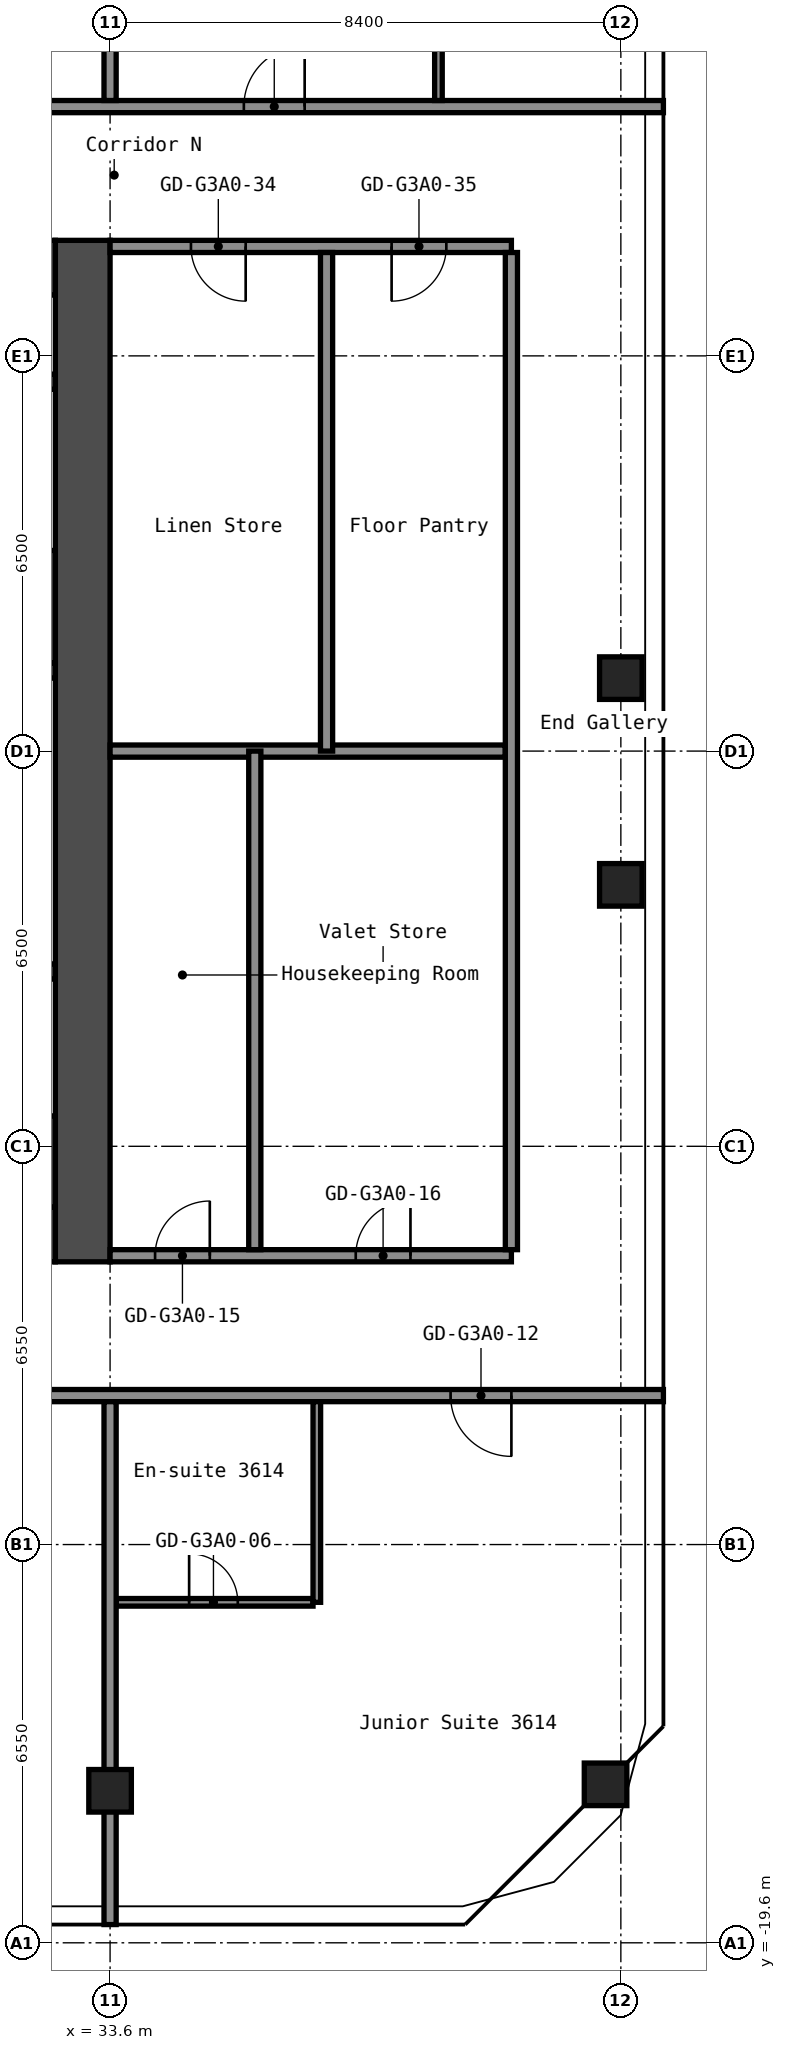
"""IFC4 building model, lengths in metres.
Left out: names, types, materials, properties, quantities, classifications, styles, units other than length and angle.
Written with IfcOpenShell. Run it as: python <this file> out.ifc"""

import sys

from ifc_helpers import new_model, si_unit, direction, frame, frame_2d, origin, origin_2d, place, context, subcontext, project, spatial, rectangle, hollow_rectangle, extrude, element, fill, save


model = new_model("IFC4")
c1 = context("Model", 3, precision=1e-05, world=origin(), true_north=direction((0.0, 1.0)))
c2 = subcontext(c1, "Body", "Model", "MODEL_VIEW")
j1 = project(units=[si_unit("LENGTHUNIT", "METRE"), si_unit("PLANEANGLEUNIT", "RADIAN")], contexts=[c1])
p1 = place(None, origin())
s1 = spatial("IfcSite", under=j1, at=p1, CompositionType="ELEMENT")
p2 = place(p1, origin())
s2 = spatial("IfcBuilding", under=s1, at=p2, CompositionType="ELEMENT")
p3 = place(p2, frame((0.0, 0.0, 131.0)))
s3 = spatial("IfcBuildingStorey", under=s2, at=p3, CompositionType="ELEMENT", Elevation=131.0)
for number, where, z_axis, x_axis in (
    (1, (33.6, -17.1, 0.0), (0.0, 0.0, 1.0), (1.0, 0.0, 0.0)),
    (2, (41.749, -16.994, 0.0), (0.0, 0.0, 1.0), (1.0, 0.0, 0.0)),
    (3, (42.0, -2.2, 0.0), (0.0, 0.0, 1.0), (1.0, 0.0, 0.0)),
    (4, (42.0, 1.2, 0.0), (0.0, 0.0, 1.0), (1.0, 0.0, 0.0)),
):
    element("IfcColumn", number, at=place(p3, frame(where, z_axis=z_axis, x_axis=x_axis)), inside=s3, PredefinedType="COLUMN", context=c2, shape_type="SweptSolid", body=[
        extrude(hollow_rectangle(XDim=0.7, YDim=0.7, WallThickness=0.028, at=origin_2d()), origin(), (0.0, 0.0, 1.0), 2.75),
    ])
p4 = place(p3, frame((33.15, -8.4, 0.0), z_axis=(0.0, 0.0, 1.0), x_axis=(0.0, 1.0, 0.0)))
e5 = element("IfcWall", 5, at=p4, inside=s3, PredefinedType="SHEAR", context=c2, shape_type="SweptSolid", body=[
    extrude(rectangle(XDim=16.8, YDim=0.9, at=frame_2d((8.4, 0.0))), origin(), (0.0, 0.0, 1.0), 2.75),
])
p5 = place(p3, frame((17.7, 7.95, 0.0), z_axis=(0.0, 0.0, 1.0), x_axis=(1.0, 0.0, 0.0)))
e6 = element("IfcWall", 6, at=p5, inside=s3, PredefinedType="SHEAR", context=c2, shape_type="SweptSolid", body=[
    extrude(rectangle(XDim=15.0, YDim=0.9, at=frame_2d((7.5, 0.0))), origin(), (0.0, 0.0, 1.0), 2.75),
])
p6 = place(p5, frame((10.4, 0.0, 0.0)))
e7 = element("IfcOpeningElement", 7, at=p6, cuts=e6, PredefinedType="OPENING", context=c2, shape_type="SweptSolid", body=[
    extrude(rectangle(XDim=1.2, YDim=2.1, at=frame_2d((0.6, 1.05))), frame((0.0, 0.46, 0.0), z_axis=(0.0, -1.0, 0.0), x_axis=(1.0, 0.0, 0.0)), (0.0, 0.0, 1.0), 0.92),
])
p7 = place(p5, frame((13.35, 0.0, 0.0)))
e8 = element("IfcOpeningElement", 8, at=p7, cuts=e6, PredefinedType="OPENING", context=c2, shape_type="SweptSolid", body=[
    extrude(rectangle(XDim=0.9, YDim=2.1, at=frame_2d((0.45, 1.05))), frame((0.0, 0.46, 0.0), z_axis=(0.0, -1.0, 0.0), x_axis=(1.0, 0.0, 0.0)), (0.0, 0.0, 1.0), 0.92),
])
p8 = place(p3, frame((17.7, -7.95, 0.0), z_axis=(0.0, 0.0, 1.0), x_axis=(1.0, 0.0, 0.0)))
e9 = element("IfcWall", 9, at=p8, inside=s3, PredefinedType="SHEAR", context=c2, shape_type="SweptSolid", body=[
    extrude(rectangle(XDim=15.0, YDim=0.9, at=frame_2d((7.5, 0.0))), origin(), (0.0, 0.0, 1.0), 2.75),
])
p9 = place(p8, frame((2.55, 0.0, 0.0)))
e10 = element("IfcOpeningElement", 10, at=p9, cuts=e9, PredefinedType="OPENING", context=c2, shape_type="SweptSolid", body=[
    extrude(rectangle(XDim=1.0, YDim=2.1, at=frame_2d((0.5, 1.05))), frame((0.0, 0.46, 0.0), z_axis=(0.0, -1.0, 0.0), x_axis=(1.0, 0.0, 0.0)), (0.0, 0.0, 1.0), 0.92),
])
p10 = place(p3, frame((27.65, 1.325, 0.0), z_axis=(0.0, 0.0, 1.0), x_axis=(1.0, 0.0, 0.0)))
e11 = element("IfcWall", 11, at=p10, inside=s3, PredefinedType="SHEAR", context=c2, shape_type="SweptSolid", body=[
    extrude(rectangle(XDim=5.05, YDim=0.25, at=frame_2d((2.525, 0.0))), origin(), (0.0, 0.0, 1.0), 2.75),
])
p11 = place(p10, frame((0.55, 0.0, 0.0)))
e12 = element("IfcOpeningElement", 12, at=p11, cuts=e11, PredefinedType="OPENING", context=c2, shape_type="SweptSolid", body=[
    extrude(rectangle(XDim=1.2, YDim=2.1, at=frame_2d((0.6, 1.05))), frame((0.0, 0.135, 0.0), z_axis=(0.0, -1.0, 0.0), x_axis=(1.0, 0.0, 0.0)), (0.0, 0.0, 1.0), 0.27),
])
p12 = place(p3, frame((30.3, 2.375, 0.0), z_axis=(0.0, 0.0, 1.0), x_axis=(1.0, 0.0, 0.0)))
e13 = element("IfcWall", 13, at=p12, inside=s3, PredefinedType="SHEAR", context=c2, shape_type="SweptSolid", body=[
    extrude(rectangle(XDim=2.4, YDim=1.85, at=frame_2d((1.2, 0.0))), origin(), (0.0, 0.0, 1.0), 2.75),
])
p13 = place(p3, frame((30.3, 6.075, 0.0), z_axis=(0.0, 0.0, 1.0), x_axis=(1.0, 0.0, 0.0)))
e14 = element("IfcWall", 14, at=p13, inside=s3, PredefinedType="SHEAR", context=c2, shape_type="SweptSolid", body=[
    extrude(rectangle(XDim=2.4, YDim=0.25, at=frame_2d((1.2, 0.0))), origin(), (0.0, 0.0, 1.0), 2.75),
])
p14 = place(p3, frame((28.15, -3.625, 0.0), z_axis=(0.0, 0.0, 1.0), x_axis=(1.0, 0.0, 0.0)))
e15 = element("IfcWall", 15, at=p14, inside=s3, PredefinedType="SHEAR", context=c2, shape_type="SweptSolid", body=[
    extrude(rectangle(XDim=4.55, YDim=0.25, at=frame_2d((2.275, 0.0))), origin(), (0.0, 0.0, 1.0), 2.75),
])
p15 = place(p3, frame((28.15, -6.75, 0.0), z_axis=(0.0, 0.0, 1.0), x_axis=(1.0, 0.0, 0.0)))
e16 = element("IfcWall", 16, at=p15, inside=s3, PredefinedType="SHEAR", context=c2, shape_type="SweptSolid", body=[
    extrude(rectangle(XDim=4.55, YDim=1.5, at=frame_2d((2.275, 0.0))), origin(), (0.0, 0.0, 1.0), 2.75),
])
p16 = place(p3, frame((33.7, -14.0, 0.0), z_axis=(0.0, 0.0, 1.0), x_axis=(1.0, 0.0, 0.0)))
e17 = element("IfcWall", 17, at=p16, inside=s3, PredefinedType="PARTITIONING", context=c2, shape_type="SweptSolid", body=[
    extrude(rectangle(XDim=3.238, YDim=0.125, at=frame_2d((1.619, 0.0))), origin(), (0.0, 0.0, 1.0), 2.75),
])
p17 = place(p16, frame((1.2, 0.0, 0.0)))
e18 = element("IfcOpeningElement", 18, at=p17, cuts=e17, PredefinedType="OPENING", context=c2, shape_type="SweptSolid", body=[
    extrude(rectangle(XDim=0.8, YDim=2.1, at=frame_2d((0.4, 1.05))), frame((0.0, 0.073, 0.0), z_axis=(0.0, -1.0, 0.0), x_axis=(1.0, 0.0, 0.0)), (0.0, 0.0, 1.0), 0.145),
])
p18 = place(p3, frame((16.8, -10.6, 0.0), z_axis=(0.0, 0.0, 1.0), x_axis=(1.0, 0.0, 0.0)))
e19 = element("IfcWall", 19, at=p18, inside=s3, PredefinedType="PARTITIONING", context=c2, shape_type="SweptSolid", body=[
    extrude(rectangle(XDim=25.9, YDim=0.2, at=frame_2d((12.95, 0.0))), origin(), (0.0, 0.0, 1.0), 2.75),
])
p19 = place(p18, frame((5.4, 0.0, 0.0)))
e20 = element("IfcOpeningElement", 20, at=p19, cuts=e19, PredefinedType="OPENING", context=c2, shape_type="SweptSolid", body=[
    extrude(rectangle(XDim=1.0, YDim=2.1, at=frame_2d((0.5, 1.05))), frame((0.0, 0.11, 0.0), z_axis=(0.0, -1.0, 0.0), x_axis=(1.0, 0.0, 0.0)), (0.0, 0.0, 1.0), 0.22),
])
p20 = place(p18, frame((13.8, 0.0, 0.0)))
e21 = element("IfcOpeningElement", 21, at=p20, cuts=e19, PredefinedType="OPENING", context=c2, shape_type="SweptSolid", body=[
    extrude(rectangle(XDim=1.0, YDim=2.1, at=frame_2d((0.5, 1.05))), frame((0.0, 0.11, 0.0), z_axis=(0.0, -1.0, 0.0), x_axis=(1.0, 0.0, 0.0)), (0.0, 0.0, 1.0), 0.22),
])
p21 = place(p18, frame((22.4, 0.0, 0.0)))
e22 = element("IfcOpeningElement", 22, at=p21, cuts=e19, PredefinedType="OPENING", context=c2, shape_type="SweptSolid", body=[
    extrude(rectangle(XDim=1.0, YDim=2.1, at=frame_2d((0.5, 1.05))), frame((0.0, 0.11, 0.0), z_axis=(0.0, -1.0, 0.0), x_axis=(1.0, 0.0, 0.0)), (0.0, 0.0, 1.0), 0.22),
])
p22 = place(p3, frame((33.6, -8.3, 0.0), z_axis=(0.0, 0.0, 1.0), x_axis=(1.0, 0.0, 0.0)))
e23 = element("IfcWall", 23, at=p22, inside=s3, PredefinedType="PARTITIONING", context=c2, shape_type="SweptSolid", body=[
    extrude(rectangle(XDim=6.6, YDim=0.2, at=frame_2d((3.3, 0.0))), origin(), (0.0, 0.0, 1.0), 2.75),
])
p23 = place(p22, frame((0.74, 0.0, 0.0)))
e24 = element("IfcOpeningElement", 24, at=p23, cuts=e23, PredefinedType="OPENING", context=c2, shape_type="SweptSolid", body=[
    extrude(rectangle(XDim=0.9, YDim=2.1, at=frame_2d((0.45, 1.05))), frame((0.0, 0.11, 0.0), z_axis=(0.0, -1.0, 0.0), x_axis=(1.0, 0.0, 0.0)), (0.0, 0.0, 1.0), 0.22),
])
p24 = place(p22, frame((4.04, 0.0, 0.0)))
e25 = element("IfcOpeningElement", 25, at=p24, cuts=e23, PredefinedType="OPENING", context=c2, shape_type="SweptSolid", body=[
    extrude(rectangle(XDim=0.9, YDim=2.1, at=frame_2d((0.45, 1.05))), frame((0.0, 0.11, 0.0), z_axis=(0.0, -1.0, 0.0), x_axis=(1.0, 0.0, 0.0)), (0.0, 0.0, 1.0), 0.22),
])
p25 = place(p3, frame((33.6, 0.0, 0.0), z_axis=(0.0, 0.0, 1.0), x_axis=(1.0, 0.0, 0.0)))
e26 = element("IfcWall", 26, at=p25, inside=s3, PredefinedType="PARTITIONING", context=c2, shape_type="SweptSolid", body=[
    extrude(rectangle(XDim=6.5, YDim=0.2, at=frame_2d((3.25, 0.0))), origin(), (0.0, 0.0, 1.0), 2.75),
])
p26 = place(p3, frame((33.6, 8.3, 0.0), z_axis=(0.0, 0.0, 1.0), x_axis=(1.0, 0.0, 0.0)))
e27 = element("IfcWall", 27, at=p26, inside=s3, PredefinedType="PARTITIONING", context=c2, shape_type="SweptSolid", body=[
    extrude(rectangle(XDim=6.6, YDim=0.2, at=frame_2d((3.3, 0.0))), origin(), (0.0, 0.0, 1.0), 2.75),
])
p27 = place(p26, frame((1.33, 0.0, 0.0)))
e28 = element("IfcOpeningElement", 28, at=p27, cuts=e27, PredefinedType="OPENING", context=c2, shape_type="SweptSolid", body=[
    extrude(rectangle(XDim=0.9, YDim=2.1, at=frame_2d((0.45, 1.05))), frame((0.0, 0.11, 0.0), z_axis=(0.0, -1.0, 0.0), x_axis=(1.0, 0.0, 0.0)), (0.0, 0.0, 1.0), 0.22),
])
p28 = place(p26, frame((4.63, 0.0, 0.0)))
e29 = element("IfcOpeningElement", 29, at=p28, cuts=e27, PredefinedType="OPENING", context=c2, shape_type="SweptSolid", body=[
    extrude(rectangle(XDim=0.9, YDim=2.1, at=frame_2d((0.45, 1.05))), frame((0.0, 0.11, 0.0), z_axis=(0.0, -1.0, 0.0), x_axis=(1.0, 0.0, 0.0)), (0.0, 0.0, 1.0), 0.22),
])
p29 = place(p3, frame((16.8, 10.6, 0.0), z_axis=(0.0, 0.0, 1.0), x_axis=(1.0, 0.0, 0.0)))
e30 = element("IfcWall", 30, at=p29, inside=s3, PredefinedType="PARTITIONING", context=c2, shape_type="SweptSolid", body=[
    extrude(rectangle(XDim=25.9, YDim=0.2, at=frame_2d((12.95, 0.0))), origin(), (0.0, 0.0, 1.0), 2.75),
])
p30 = place(p29, frame((2.0, 0.0, 0.0)))
e31 = element("IfcOpeningElement", 31, at=p30, cuts=e30, PredefinedType="OPENING", context=c2, shape_type="SweptSolid", body=[
    extrude(rectangle(XDim=1.0, YDim=2.1, at=frame_2d((0.5, 1.05))), frame((0.0, 0.11, 0.0), z_axis=(0.0, -1.0, 0.0), x_axis=(1.0, 0.0, 0.0)), (0.0, 0.0, 1.0), 0.22),
])
p31 = place(p29, frame((10.4, 0.0, 0.0)))
e32 = element("IfcOpeningElement", 32, at=p31, cuts=e30, PredefinedType="OPENING", context=c2, shape_type="SweptSolid", body=[
    extrude(rectangle(XDim=1.0, YDim=2.1, at=frame_2d((0.5, 1.05))), frame((0.0, 0.11, 0.0), z_axis=(0.0, -1.0, 0.0), x_axis=(1.0, 0.0, 0.0)), (0.0, 0.0, 1.0), 0.22),
])
p32 = place(p29, frame((19.0, 0.0, 0.0)))
e33 = element("IfcOpeningElement", 33, at=p32, cuts=e30, PredefinedType="OPENING", context=c2, shape_type="SweptSolid", body=[
    extrude(rectangle(XDim=1.0, YDim=2.1, at=frame_2d((0.5, 1.05))), frame((0.0, 0.11, 0.0), z_axis=(0.0, -1.0, 0.0), x_axis=(1.0, 0.0, 0.0)), (0.0, 0.0, 1.0), 0.22),
])
p33 = place(p3, frame((33.6, -19.3, 0.0), z_axis=(0.0, 0.0, 1.0), x_axis=(0.0, 1.0, 0.0)))
e34 = element("IfcWall", 34, at=p33, inside=s3, PredefinedType="PARTITIONING", context=c2, shape_type="SweptSolid", body=[
    extrude(rectangle(XDim=8.6, YDim=0.2, at=frame_2d((4.3, 0.0))), origin(), (0.0, 0.0, 1.0), 2.75),
])
p34 = place(p3, frame((33.6, 10.7, 0.0), z_axis=(0.0, 0.0, 1.0), x_axis=(0.0, 1.0, 0.0)))
e35 = element("IfcWall", 35, at=p34, inside=s3, PredefinedType="PARTITIONING", context=c2, shape_type="SweptSolid", body=[
    extrude(rectangle(XDim=7.6, YDim=0.2, at=frame_2d((3.8, 0.0))), origin(), (0.0, 0.0, 1.0), 2.75),
])
p35 = place(p3, frame((35.98, -8.2, 0.0), z_axis=(0.0, 0.0, 1.0), x_axis=(0.0, 1.0, 0.0)))
e36 = element("IfcWall", 36, at=p35, inside=s3, PredefinedType="PARTITIONING", context=c2, shape_type="SweptSolid", body=[
    extrude(rectangle(XDim=8.2, YDim=0.2, at=frame_2d((4.1, 0.0))), origin(), (0.0, 0.0, 1.0), 2.75),
])
p36 = place(p3, frame((37.0, -14.0, 0.0), z_axis=(0.0, 0.0, 1.0), x_axis=(0.0, 1.0, 0.0)))
e37 = element("IfcWall", 37, at=p36, inside=s3, PredefinedType="PARTITIONING", context=c2, shape_type="SweptSolid", body=[
    extrude(rectangle(XDim=3.3, YDim=0.125, at=frame_2d((1.65, 0.0))), origin(), (0.0, 0.0, 1.0), 2.75),
])
p37 = place(p3, frame((37.16, 0.0, 0.0), z_axis=(0.0, 0.0, 1.0), x_axis=(0.0, 1.0, 0.0)))
e38 = element("IfcWall", 38, at=p37, inside=s3, PredefinedType="PARTITIONING", context=c2, shape_type="SweptSolid", body=[
    extrude(rectangle(XDim=8.2, YDim=0.2, at=frame_2d((4.1, 0.0))), origin(), (0.0, 0.0, 1.0), 2.75),
])
p38 = place(p3, frame((39.0, 10.7, 0.0), z_axis=(0.0, 0.0, 1.0), x_axis=(0.0, 1.0, 0.0)))
e39 = element("IfcWall", 39, at=p38, inside=s3, PredefinedType="PARTITIONING", context=c2, shape_type="SweptSolid", body=[
    extrude(rectangle(XDim=3.3, YDim=0.125, at=frame_2d((1.65, 0.0))), origin(), (0.0, 0.0, 1.0), 2.75),
])
p39 = place(p3, frame((40.2, -8.2, 0.0), z_axis=(0.0, 0.0, 1.0), x_axis=(0.0, 1.0, 0.0)))
e40 = element("IfcWall", 40, at=p39, inside=s3, PredefinedType="PARTITIONING", context=c2, shape_type="SweptSolid", body=[
    extrude(rectangle(XDim=16.4, YDim=0.2, at=frame_2d((8.2, 0.0))), origin(), (0.0, 0.0, 1.0), 2.75),
])
p40 = place(p17, origin())
e41 = element("IfcDoor", 41, at=p40, inside=s3, OperationType="SINGLE_SWING_RIGHT", PredefinedType="DOOR", context=c2, shape_type="SweptSolid", body=[
    extrude(rectangle(XDim=0.8, YDim=2.1, at=frame_2d((0.4, 1.05))), frame((0.0, 0.025, 0.0), z_axis=(0.0, -1.0, 0.0), x_axis=(1.0, 0.0, 0.0)), (0.0, 0.0, 1.0), 0.05),
])
fill(e18, e41)
p41 = place(p21, origin())
e42 = element("IfcDoor", 42, at=p41, inside=s3, OperationType="SINGLE_SWING_RIGHT", PredefinedType="DOOR", context=c2, shape_type="SweptSolid", body=[
    extrude(rectangle(XDim=1.0, YDim=2.1, at=frame_2d((0.5, 1.05))), frame((0.0, 0.025, 0.0), z_axis=(0.0, -1.0, 0.0), x_axis=(1.0, 0.0, 0.0)), (0.0, 0.0, 1.0), 0.05),
])
fill(e22, e42)
p42 = place(p23, origin())
e43 = element("IfcDoor", 43, at=p42, inside=s3, OperationType="SINGLE_SWING_LEFT", PredefinedType="DOOR", context=c2, shape_type="SweptSolid", body=[
    extrude(rectangle(XDim=0.9, YDim=2.1, at=frame_2d((0.45, 1.05))), frame((0.0, 0.025, 0.0), z_axis=(0.0, -1.0, 0.0), x_axis=(1.0, 0.0, 0.0)), (0.0, 0.0, 1.0), 0.05),
])
fill(e24, e43)
p43 = place(p24, origin())
e44 = element("IfcDoor", 44, at=p43, inside=s3, OperationType="SINGLE_SWING_LEFT", PredefinedType="DOOR", context=c2, shape_type="SweptSolid", body=[
    extrude(rectangle(XDim=0.9, YDim=2.1, at=frame_2d((0.45, 1.05))), frame((0.0, 0.025, 0.0), z_axis=(0.0, -1.0, 0.0), x_axis=(1.0, 0.0, 0.0)), (0.0, 0.0, 1.0), 0.05),
])
fill(e25, e44)
p44 = place(p27, origin())
e45 = element("IfcDoor", 45, at=p44, inside=s3, OperationType="SINGLE_SWING_RIGHT", PredefinedType="DOOR", context=c2, shape_type="SweptSolid", body=[
    extrude(rectangle(XDim=0.9, YDim=2.1, at=frame_2d((0.45, 1.05))), frame((0.0, 0.025, 0.0), z_axis=(0.0, -1.0, 0.0), x_axis=(1.0, 0.0, 0.0)), (0.0, 0.0, 1.0), 0.05),
])
fill(e28, e45)
p45 = place(p28, origin())
e46 = element("IfcDoor", 46, at=p45, inside=s3, OperationType="SINGLE_SWING_LEFT", PredefinedType="DOOR", context=c2, shape_type="SweptSolid", body=[
    extrude(rectangle(XDim=0.9, YDim=2.1, at=frame_2d((0.45, 1.05))), frame((0.0, 0.025, 0.0), z_axis=(0.0, -1.0, 0.0), x_axis=(1.0, 0.0, 0.0)), (0.0, 0.0, 1.0), 0.05),
])
fill(e29, e46)
p46 = place(p32, origin())
e47 = element("IfcDoor", 47, at=p46, inside=s3, OperationType="SINGLE_SWING_LEFT", PredefinedType="DOOR", context=c2, shape_type="SweptSolid", body=[
    extrude(rectangle(XDim=1.0, YDim=2.1, at=frame_2d((0.5, 1.05))), frame((0.0, 0.025, 0.0), z_axis=(0.0, -1.0, 0.0), x_axis=(1.0, 0.0, 0.0)), (0.0, 0.0, 1.0), 0.05),
])
fill(e33, e47)
save(model, sys.argv[1])
